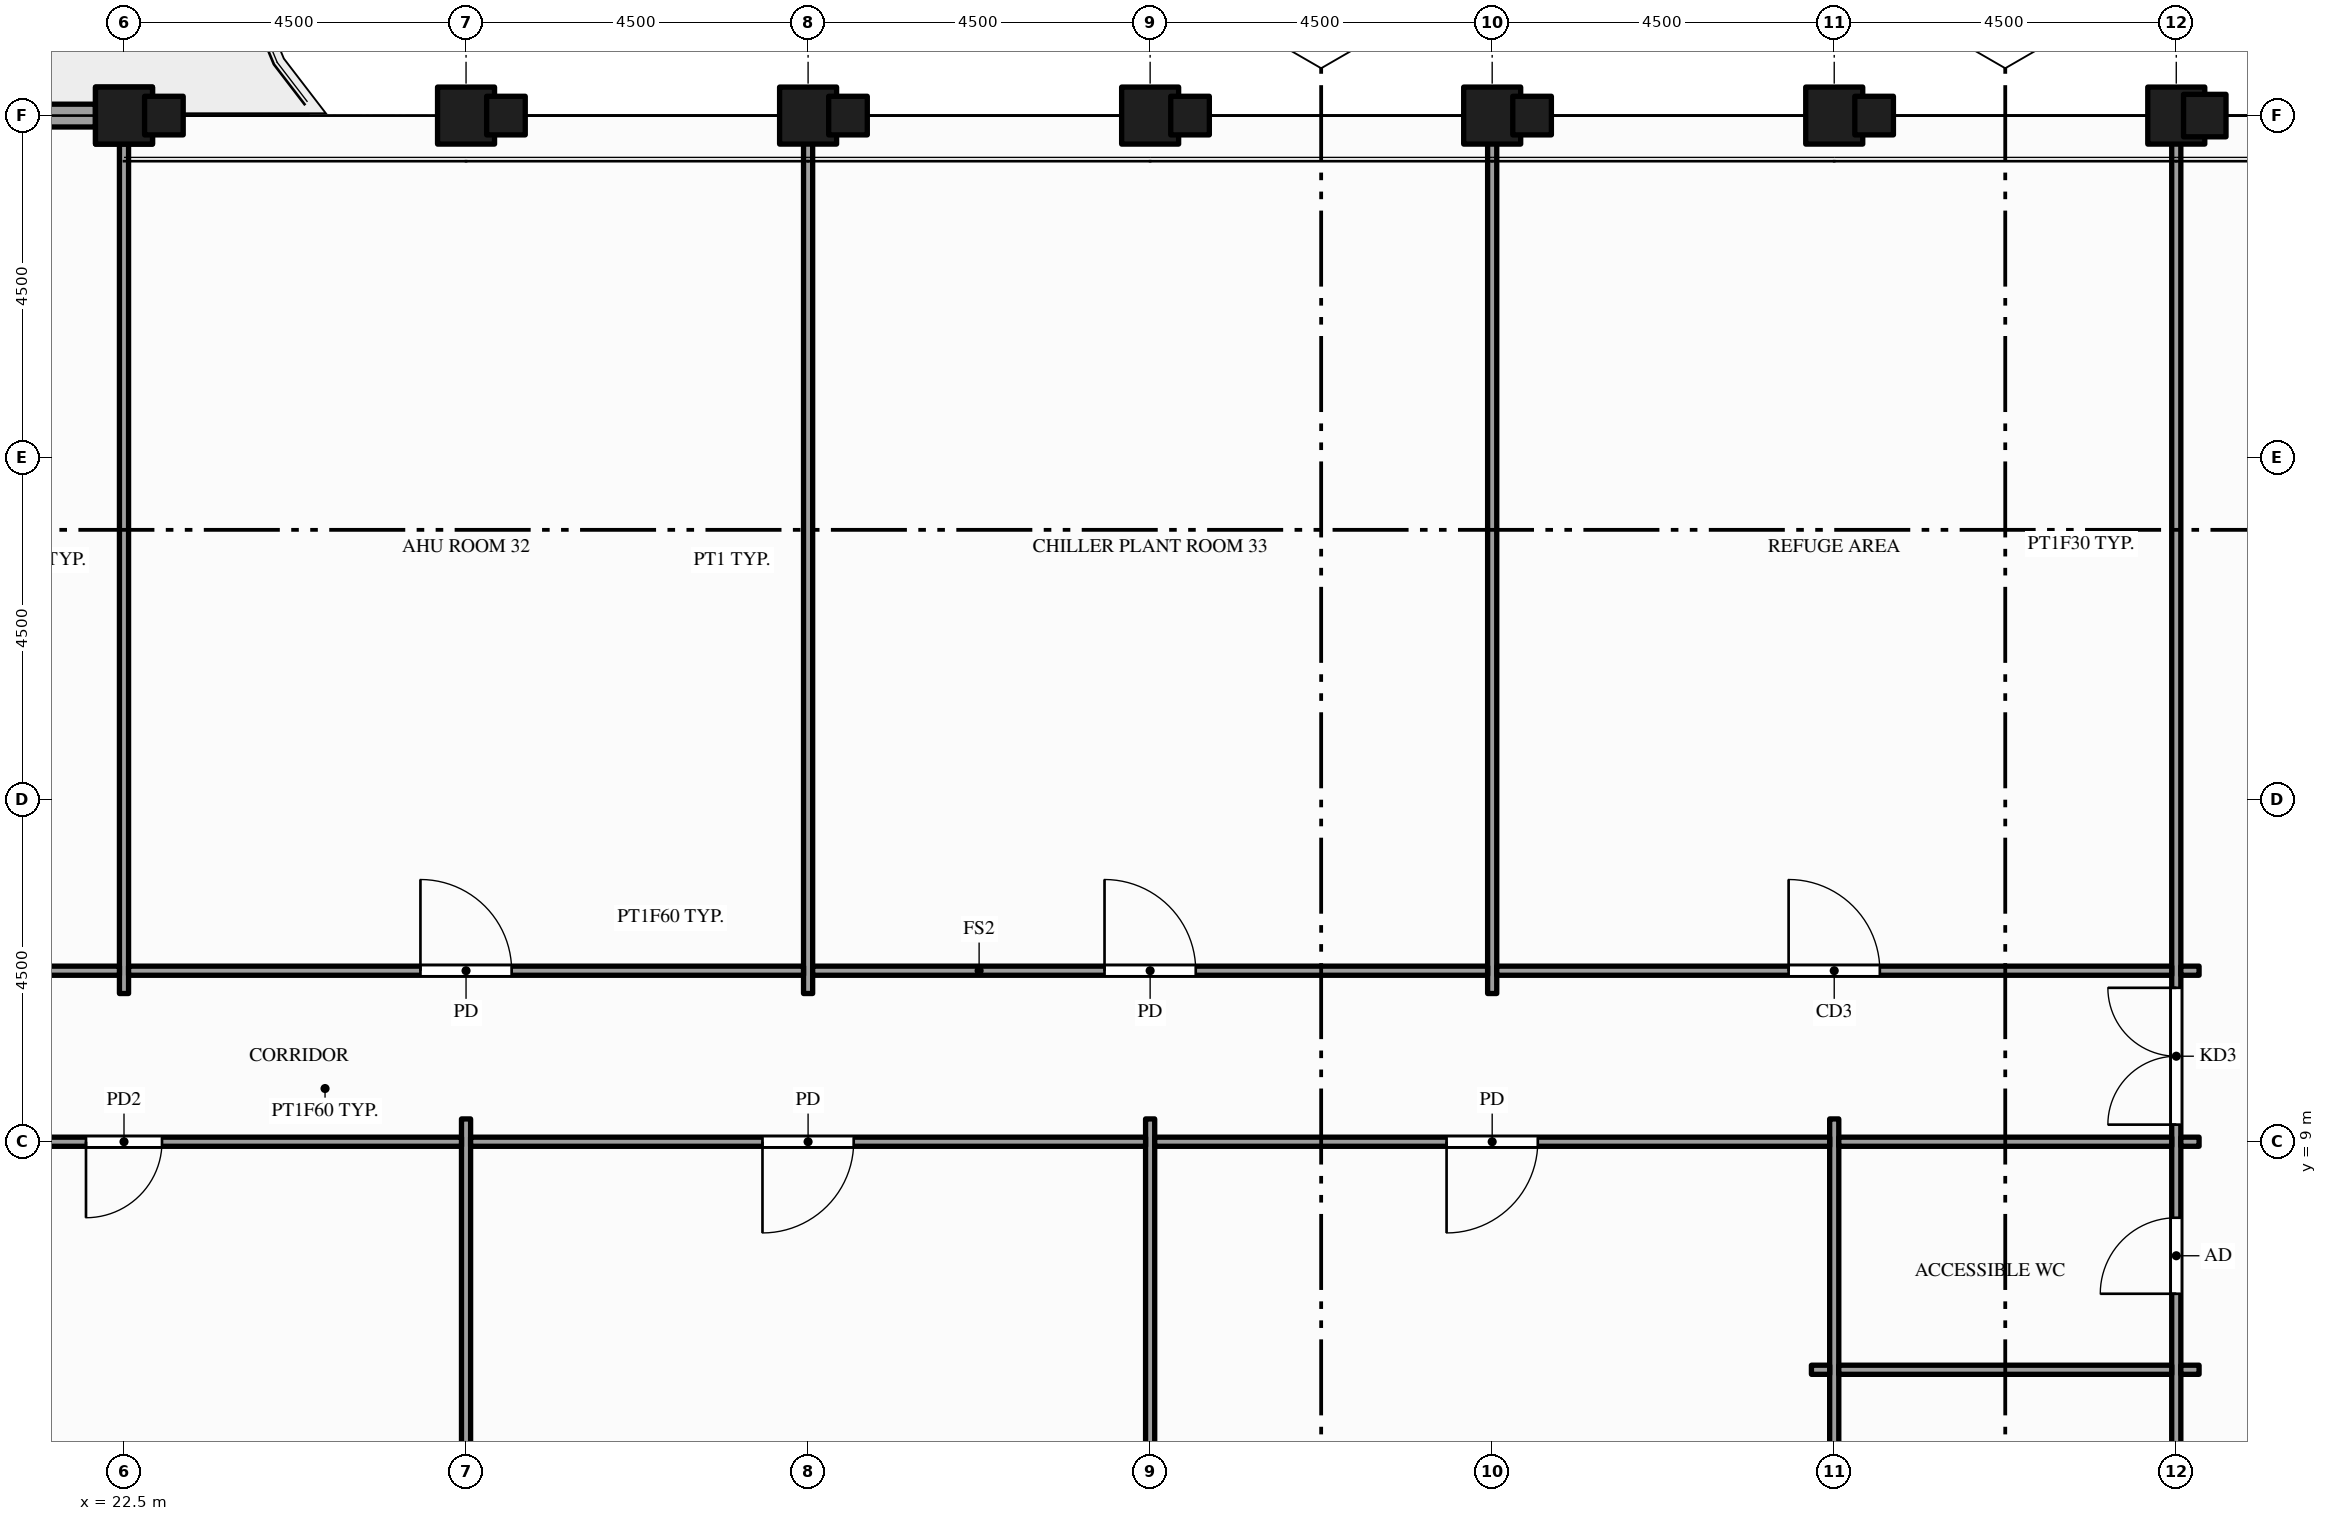
"""IFC4 building model, lengths in metres.
Left out: names, types, materials, properties, quantities, classifications, styles, units other than length and angle.
Written with IfcOpenShell. Run it as: python <this file> out.ifc"""

import sys

from ifc_helpers import new_model, si_unit, direction, frame, frame_2d, origin, origin_2d, place, context, subcontext, project, spatial, rectangle, hollow_rectangle, extrude, element, fill, save


model = new_model("IFC4")
c1 = context("Model", 3, precision=1e-05, world=origin(), true_north=direction((0.0, 1.0)))
c2 = subcontext(c1, "Body", "Model", "MODEL_VIEW")
j1 = project(units=[si_unit("LENGTHUNIT", "METRE"), si_unit("PLANEANGLEUNIT", "RADIAN")], contexts=[c1])
p1 = place(None, origin())
s1 = spatial("IfcSite", under=j1, at=p1, CompositionType="ELEMENT")
p2 = place(p1, origin())
s2 = spatial("IfcBuilding", under=s1, at=p2, CompositionType="ELEMENT")
p3 = place(p2, frame((0.0, 0.0, 243.0)))
s3 = spatial("IfcBuildingStorey", under=s2, at=p3, CompositionType="ELEMENT", Elevation=243.0)
p4 = place(p3, frame((22.5, 22.5, -0.3), z_axis=(0.0, 0.0, 1.0), x_axis=(1.0, 0.0, 0.0)))
e1 = element("IfcColumn", 1, at=p4, inside=s3, PredefinedType="COLUMN", context=c2, shape_type="SweptSolid", body=[
    extrude(hollow_rectangle(XDim=0.75, YDim=0.75, WallThickness=0.036, at=origin_2d()), origin(), (0.0, 0.0, 1.0), 4.65),
])
p5 = place(p3, frame((22.5, 22.5, 4.35), z_axis=(0.0, 0.0, 1.0), x_axis=(1.0, 0.0, 0.0)))
e2 = element("IfcColumn", 2, at=p5, inside=s3, PredefinedType="COLUMN", context=c2, shape_type="SweptSolid", body=[
    extrude(rectangle(XDim=0.75, YDim=0.75, at=origin_2d()), origin(), (0.0, 0.0, 1.0), 1.5),
])
for number, where, z_axis, x_axis in (
    (3, (27.0, 22.5, -0.25), (0.0, 0.0, 1.0), (1.0, 0.0, 0.0)),
    (4, (31.5, 22.5, -0.25), (0.0, 0.0, 1.0), (1.0, 0.0, 0.0)),
    (5, (36.0, 22.5, -0.25), (0.0, 0.0, 1.0), (1.0, 0.0, 0.0)),
    (6, (40.5, 22.5, -0.25), (0.0, 0.0, 1.0), (1.0, 0.0, 0.0)),
    (7, (45.0, 22.5, -0.25), (0.0, 0.0, 1.0), (1.0, 0.0, 0.0)),
    (8, (49.5, 22.5, -0.25), (0.0, 0.0, 1.0), (1.0, 0.0, 0.0)),
):
    element("IfcColumn", number, at=place(p3, frame(where, z_axis=z_axis, x_axis=x_axis)), inside=s3, PredefinedType="COLUMN", context=c2, shape_type="SweptSolid", body=[
        extrude(hollow_rectangle(XDim=0.75, YDim=0.75, WallThickness=0.036, at=origin_2d()), origin(), (0.0, 0.0, 1.0), 6.1),
    ])
p6 = place(p3, frame((22.125, 22.5, 0.0), z_axis=(0.0, 0.0, 1.0), x_axis=(-1.0, 0.0, 0.0)))
e9 = element("IfcWall", 9, at=p6, inside=s3, PredefinedType="STANDARD", context=c2, shape_type="SweptSolid", body=[
    extrude(rectangle(XDim=3.75, YDim=0.3, at=frame_2d((1.875, 0.0))), origin(), (0.0, 0.0, 1.0), 5.157),
])
p7 = place(p3, frame((22.5, 10.95, 0.0), z_axis=(0.0, 0.0, 1.0), x_axis=(0.0, 1.0, 0.0)))
e10 = element("IfcWall", 10, at=p7, inside=s3, PredefinedType="PARTITIONING", context=c2, shape_type="SweptSolid", body=[
    extrude(rectangle(XDim=11.4, YDim=0.12, at=frame_2d((5.7, 0.0))), origin(), (0.0, 0.0, 1.0), 4.87),
])
p8 = place(p3, frame((27.0, 0.15, 0.0), z_axis=(0.0, 0.0, 1.0), x_axis=(0.0, 1.0, 0.0)))
e11 = element("IfcWall", 11, at=p8, inside=s3, PredefinedType="PARTITIONING", context=c2, shape_type="SweptSolid", body=[
    extrude(rectangle(XDim=9.15, YDim=0.12, at=frame_2d((4.575, 0.0))), origin(), (0.0, 0.0, 1.0), 4.45),
])
p9 = place(p3, frame((31.5, 10.95, 0.0), z_axis=(0.0, 0.0, 1.0), x_axis=(0.0, 1.0, 0.0)))
e12 = element("IfcWall", 12, at=p9, inside=s3, PredefinedType="PARTITIONING", context=c2, shape_type="SweptSolid", body=[
    extrude(rectangle(XDim=11.4, YDim=0.12, at=frame_2d((5.7, 0.0))), origin(), (0.0, 0.0, 1.0), 4.87),
])
p10 = place(p3, frame((36.0, 0.15, 0.0), z_axis=(0.0, 0.0, 1.0), x_axis=(0.0, 1.0, 0.0)))
e13 = element("IfcWall", 13, at=p10, inside=s3, PredefinedType="PARTITIONING", context=c2, shape_type="SweptSolid", body=[
    extrude(rectangle(XDim=9.15, YDim=0.12, at=frame_2d((4.575, 0.0))), origin(), (0.0, 0.0, 1.0), 4.45),
])
p11 = place(p3, frame((40.5, 10.95, 0.0), z_axis=(0.0, 0.0, 1.0), x_axis=(0.0, 1.0, 0.0)))
e14 = element("IfcWall", 14, at=p11, inside=s3, PredefinedType="PARTITIONING", context=c2, shape_type="SweptSolid", body=[
    extrude(rectangle(XDim=11.4, YDim=0.12, at=frame_2d((5.7, 0.0))), origin(), (0.0, 0.0, 1.0), 4.87),
])
p12 = place(p3, frame((45.0, 0.15, 0.0), z_axis=(0.0, 0.0, 1.0), x_axis=(0.0, 1.0, 0.0)))
e15 = element("IfcWall", 15, at=p12, inside=s3, PredefinedType="PARTITIONING", context=c2, shape_type="SweptSolid", body=[
    extrude(rectangle(XDim=9.15, YDim=0.12, at=frame_2d((4.575, 0.0))), origin(), (0.0, 0.0, 1.0), 4.45),
])
p13 = place(p3, frame((49.5, 0.15, 0.0), z_axis=(0.0, 0.0, 1.0), x_axis=(0.0, 1.0, 0.0)))
e16 = element("IfcWall", 16, at=p13, inside=s3, PredefinedType="PARTITIONING", context=c2, shape_type="SweptSolid", body=[
    extrude(rectangle(XDim=22.2, YDim=0.12, at=frame_2d((11.1, 0.0))), origin(), (0.0, 0.0, 1.0), 4.45),
])
p14 = place(p13, frame((9.075, 0.0, 0.0)))
e17 = element("IfcOpeningElement", 17, at=p14, cuts=e16, PredefinedType="OPENING", context=c2, shape_type="SweptSolid", body=[
    extrude(rectangle(XDim=1.8, YDim=2.1, at=frame_2d((0.9, 1.05))), frame((0.0, 0.07, 0.0), z_axis=(0.0, -1.0, 0.0), x_axis=(1.0, 0.0, 0.0)), (0.0, 0.0, 1.0), 0.14),
])
p15 = place(p13, frame((0.85, 0.0, 0.0)))
e18 = element("IfcOpeningElement", 18, at=p15, cuts=e16, PredefinedType="OPENING", context=c2, shape_type="SweptSolid", body=[
    extrude(rectangle(XDim=0.9, YDim=2.1, at=frame_2d((0.45, 1.05))), frame((0.0, 0.07, 0.0), z_axis=(0.0, -1.0, 0.0), x_axis=(1.0, 0.0, 0.0)), (0.0, 0.0, 1.0), 0.14),
])
p16 = place(p13, frame((3.9, 0.0, 0.0)))
e19 = element("IfcOpeningElement", 19, at=p16, cuts=e16, PredefinedType="OPENING", context=c2, shape_type="SweptSolid", body=[
    extrude(rectangle(XDim=0.9, YDim=2.1, at=frame_2d((0.45, 1.05))), frame((0.0, 0.07, 0.0), z_axis=(0.0, -1.0, 0.0), x_axis=(1.0, 0.0, 0.0)), (0.0, 0.0, 1.0), 0.14),
])
p17 = place(p13, frame((6.85, 0.0, 0.0)))
e20 = element("IfcOpeningElement", 20, at=p17, cuts=e16, PredefinedType="OPENING", context=c2, shape_type="SweptSolid", body=[
    extrude(rectangle(XDim=1.0, YDim=2.1, at=frame_2d((0.5, 1.05))), frame((0.0, 0.07, 0.0), z_axis=(0.0, -1.0, 0.0), x_axis=(1.0, 0.0, 0.0)), (0.0, 0.0, 1.0), 0.14),
])
p18 = place(p3, frame((44.7, 6.0, 0.0), z_axis=(0.0, 0.0, 1.0), x_axis=(1.0, 0.0, 0.0)))
e21 = element("IfcWall", 21, at=p18, inside=s3, PredefinedType="PARTITIONING", context=c2, shape_type="SweptSolid", body=[
    extrude(rectangle(XDim=0.24, YDim=0.12, at=frame_2d((0.12, 0.0))), origin(), (0.0, 0.0, 1.0), 4.87),
])
p19 = place(p3, frame((45.06, 6.0, 0.0), z_axis=(0.0, 0.0, 1.0), x_axis=(1.0, 0.0, 0.0)))
e22 = element("IfcWall", 22, at=p19, inside=s3, PredefinedType="PARTITIONING", context=c2, shape_type="SweptSolid", body=[
    extrude(rectangle(XDim=4.38, YDim=0.12, at=frame_2d((2.19, 0.0))), origin(), (0.0, 0.0, 1.0), 4.87),
])
p20 = place(p3, frame((49.56, 6.0, 0.0), z_axis=(0.0, 0.0, 1.0), x_axis=(1.0, 0.0, 0.0)))
e23 = element("IfcWall", 23, at=p20, inside=s3, PredefinedType="PARTITIONING", context=c2, shape_type="SweptSolid", body=[
    extrude(rectangle(XDim=0.24, YDim=0.12, at=frame_2d((0.12, 0.0))), origin(), (0.0, 0.0, 1.0), 4.87),
])
p21 = place(p3, frame((18.06, 9.0, 0.0), z_axis=(0.0, 0.0, 1.0), x_axis=(1.0, 0.0, 0.0)))
e24 = element("IfcWall", 24, at=p21, inside=s3, PredefinedType="PARTITIONING", context=c2, shape_type="SweptSolid", body=[
    extrude(rectangle(XDim=8.88, YDim=0.12, at=frame_2d((4.44, 0.0))), origin(), (0.0, 0.0, 1.0), 4.87),
])
p22 = place(p21, frame((3.94, 0.0, 0.0)))
e25 = element("IfcOpeningElement", 25, at=p22, cuts=e24, PredefinedType="OPENING", context=c2, shape_type="SweptSolid", body=[
    extrude(rectangle(XDim=1.0, YDim=2.1, at=frame_2d((0.5, 1.05))), frame((0.0, 0.07, 0.0), z_axis=(0.0, -1.0, 0.0), x_axis=(1.0, 0.0, 0.0)), (0.0, 0.0, 1.0), 0.14),
])
p23 = place(p3, frame((27.06, 9.0, 0.0), z_axis=(0.0, 0.0, 1.0), x_axis=(1.0, 0.0, 0.0)))
e26 = element("IfcWall", 26, at=p23, inside=s3, PredefinedType="PARTITIONING", context=c2, shape_type="SweptSolid", body=[
    extrude(rectangle(XDim=8.88, YDim=0.12, at=frame_2d((4.44, 0.0))), origin(), (0.0, 0.0, 1.0), 4.87),
])
p24 = place(p23, frame((3.84, 0.0, 0.0)))
e27 = element("IfcOpeningElement", 27, at=p24, cuts=e26, PredefinedType="OPENING", context=c2, shape_type="SweptSolid", body=[
    extrude(rectangle(XDim=1.2, YDim=2.1, at=frame_2d((0.6, 1.05))), frame((0.0, 0.07, 0.0), z_axis=(0.0, -1.0, 0.0), x_axis=(1.0, 0.0, 0.0)), (0.0, 0.0, 1.0), 0.14),
])
p25 = place(p3, frame((36.06, 9.0, 0.0), z_axis=(0.0, 0.0, 1.0), x_axis=(1.0, 0.0, 0.0)))
e28 = element("IfcWall", 28, at=p25, inside=s3, PredefinedType="PARTITIONING", context=c2, shape_type="SweptSolid", body=[
    extrude(rectangle(XDim=8.88, YDim=0.12, at=frame_2d((4.44, 0.0))), origin(), (0.0, 0.0, 1.0), 4.87),
])
p26 = place(p25, frame((3.84, 0.0, 0.0)))
e29 = element("IfcOpeningElement", 29, at=p26, cuts=e28, PredefinedType="OPENING", context=c2, shape_type="SweptSolid", body=[
    extrude(rectangle(XDim=1.2, YDim=2.1, at=frame_2d((0.6, 1.05))), frame((0.0, 0.07, 0.0), z_axis=(0.0, -1.0, 0.0), x_axis=(1.0, 0.0, 0.0)), (0.0, 0.0, 1.0), 0.14),
])
p27 = place(p3, frame((45.06, 9.0, 0.0), z_axis=(0.0, 0.0, 1.0), x_axis=(1.0, 0.0, 0.0)))
e30 = element("IfcWall", 30, at=p27, inside=s3, PredefinedType="PARTITIONING", context=c2, shape_type="SweptSolid", body=[
    extrude(rectangle(XDim=4.38, YDim=0.12, at=frame_2d((2.19, 0.0))), origin(), (0.0, 0.0, 1.0), 4.87),
])
p28 = place(p3, frame((49.56, 9.0, 0.0), z_axis=(0.0, 0.0, 1.0), x_axis=(1.0, 0.0, 0.0)))
e31 = element("IfcWall", 31, at=p28, inside=s3, PredefinedType="PARTITIONING", context=c2, shape_type="SweptSolid", body=[
    extrude(rectangle(XDim=0.24, YDim=0.12, at=frame_2d((0.12, 0.0))), origin(), (0.0, 0.0, 1.0), 4.87),
])
p29 = place(p3, frame((0.15, 11.25, 0.0), z_axis=(0.0, 0.0, 1.0), x_axis=(1.0, 0.0, 0.0)))
e32 = element("IfcWall", 32, at=p29, inside=s3, PredefinedType="PARTITIONING", context=c2, shape_type="SweptSolid", body=[
    extrude(rectangle(XDim=22.29, YDim=0.12, at=frame_2d((11.145, 0.0))), origin(), (0.0, 0.0, 1.0), 4.87),
])
p30 = place(p29, frame((10.255, 0.0, 0.0)))
e33 = element("IfcOpeningElement", 33, at=p30, cuts=e32, PredefinedType="OPENING", context=c2, shape_type="SweptSolid", body=[
    extrude(rectangle(XDim=1.8, YDim=2.1, at=frame_2d((0.9, 1.05))), frame((0.0, 0.07, 0.0), z_axis=(0.0, -1.0, 0.0), x_axis=(1.0, 0.0, 0.0)), (0.0, 0.0, 1.0), 0.14),
])
p31 = place(p3, frame((22.56, 11.25, 0.0), z_axis=(0.0, 0.0, 1.0), x_axis=(1.0, 0.0, 0.0)))
e34 = element("IfcWall", 34, at=p31, inside=s3, PredefinedType="PARTITIONING", context=c2, shape_type="SweptSolid", body=[
    extrude(rectangle(XDim=8.88, YDim=0.12, at=frame_2d((4.44, 0.0))), origin(), (0.0, 0.0, 1.0), 4.87),
])
p32 = place(p31, frame((3.84, 0.0, 0.0)))
e35 = element("IfcOpeningElement", 35, at=p32, cuts=e34, PredefinedType="OPENING", context=c2, shape_type="SweptSolid", body=[
    extrude(rectangle(XDim=1.2, YDim=2.1, at=frame_2d((0.6, 1.05))), frame((0.0, 0.07, 0.0), z_axis=(0.0, -1.0, 0.0), x_axis=(1.0, 0.0, 0.0)), (0.0, 0.0, 1.0), 0.14),
])
p33 = place(p3, frame((31.56, 11.25, 0.0), z_axis=(0.0, 0.0, 1.0), x_axis=(1.0, 0.0, 0.0)))
e36 = element("IfcWall", 36, at=p33, inside=s3, PredefinedType="PARTITIONING", context=c2, shape_type="SweptSolid", body=[
    extrude(rectangle(XDim=8.88, YDim=0.12, at=frame_2d((4.44, 0.0))), origin(), (0.0, 0.0, 1.0), 4.87),
])
p34 = place(p33, frame((3.84, 0.0, 0.0)))
e37 = element("IfcOpeningElement", 37, at=p34, cuts=e36, PredefinedType="OPENING", context=c2, shape_type="SweptSolid", body=[
    extrude(rectangle(XDim=1.2, YDim=2.1, at=frame_2d((0.6, 1.05))), frame((0.0, 0.07, 0.0), z_axis=(0.0, -1.0, 0.0), x_axis=(1.0, 0.0, 0.0)), (0.0, 0.0, 1.0), 0.14),
])
p35 = place(p3, frame((40.56, 11.25, 0.0), z_axis=(0.0, 0.0, 1.0), x_axis=(1.0, 0.0, 0.0)))
e38 = element("IfcWall", 38, at=p35, inside=s3, PredefinedType="PARTITIONING", context=c2, shape_type="SweptSolid", body=[
    extrude(rectangle(XDim=8.88, YDim=0.12, at=frame_2d((4.44, 0.0))), origin(), (0.0, 0.0, 1.0), 4.87),
])
p36 = place(p35, frame((3.84, 0.0, 0.0)))
e39 = element("IfcOpeningElement", 39, at=p36, cuts=e38, PredefinedType="OPENING", context=c2, shape_type="SweptSolid", body=[
    extrude(rectangle(XDim=1.2, YDim=2.1, at=frame_2d((0.6, 1.05))), frame((0.0, 0.07, 0.0), z_axis=(0.0, -1.0, 0.0), x_axis=(1.0, 0.0, 0.0)), (0.0, 0.0, 1.0), 0.14),
])
p37 = place(p3, frame((49.56, 11.25, 0.0), z_axis=(0.0, 0.0, 1.0), x_axis=(1.0, 0.0, 0.0)))
e40 = element("IfcWall", 40, at=p37, inside=s3, PredefinedType="PARTITIONING", context=c2, shape_type="SweptSolid", body=[
    extrude(rectangle(XDim=0.24, YDim=0.12, at=frame_2d((0.12, 0.0))), origin(), (0.0, 0.0, 1.0), 4.87),
])
p38 = place(p14, origin())
e41 = element("IfcDoor", 41, at=p38, inside=s3, OperationType="DOUBLE_DOOR_SINGLE_SWING", PredefinedType="DOOR", context=c2, shape_type="SweptSolid", body=[
    extrude(rectangle(XDim=1.8, YDim=2.1, at=frame_2d((0.9, 1.05))), frame((0.0, 0.025, 0.0), z_axis=(0.0, -1.0, 0.0), x_axis=(1.0, 0.0, 0.0)), (0.0, 0.0, 1.0), 0.05),
])
fill(e17, e41)
p39 = place(p22, origin())
e42 = element("IfcDoor", 42, at=p39, inside=s3, OperationType="SINGLE_SWING_LEFT", PredefinedType="DOOR", context=c2, shape_type="SweptSolid", body=[
    extrude(rectangle(XDim=1.0, YDim=2.1, at=frame_2d((0.5, 1.05))), frame((0.0, 0.025, 0.0), z_axis=(0.0, -1.0, 0.0), x_axis=(1.0, 0.0, 0.0)), (0.0, 0.0, 1.0), 0.05),
])
fill(e25, e42)
p40 = place(p24, origin())
e43 = element("IfcDoor", 43, at=p40, inside=s3, OperationType="SINGLE_SWING_LEFT", PredefinedType="DOOR", context=c2, shape_type="SweptSolid", body=[
    extrude(rectangle(XDim=1.2, YDim=2.1, at=frame_2d((0.6, 1.05))), frame((0.0, 0.025, 0.0), z_axis=(0.0, -1.0, 0.0), x_axis=(1.0, 0.0, 0.0)), (0.0, 0.0, 1.0), 0.05),
])
fill(e27, e43)
p41 = place(p26, origin())
e44 = element("IfcDoor", 44, at=p41, inside=s3, OperationType="SINGLE_SWING_LEFT", PredefinedType="DOOR", context=c2, shape_type="SweptSolid", body=[
    extrude(rectangle(XDim=1.2, YDim=2.1, at=frame_2d((0.6, 1.05))), frame((0.0, 0.025, 0.0), z_axis=(0.0, -1.0, 0.0), x_axis=(1.0, 0.0, 0.0)), (0.0, 0.0, 1.0), 0.05),
])
fill(e29, e44)
p42 = place(p17, origin())
e45 = element("IfcDoor", 45, at=p42, inside=s3, OperationType="SINGLE_SWING_LEFT", PredefinedType="DOOR", context=c2, shape_type="SweptSolid", body=[
    extrude(rectangle(XDim=1.0, YDim=2.1, at=frame_2d((0.5, 1.05))), frame((0.0, 0.025, 0.0), z_axis=(0.0, -1.0, 0.0), x_axis=(1.0, 0.0, 0.0)), (0.0, 0.0, 1.0), 0.05),
])
fill(e20, e45)
p43 = place(p32, origin())
e46 = element("IfcDoor", 46, at=p43, inside=s3, OperationType="SINGLE_SWING_LEFT", PredefinedType="DOOR", context=c2, shape_type="SweptSolid", body=[
    extrude(rectangle(XDim=1.2, YDim=2.1, at=frame_2d((0.6, 1.05))), frame((0.0, 0.025, 0.0), z_axis=(0.0, -1.0, 0.0), x_axis=(1.0, 0.0, 0.0)), (0.0, 0.0, 1.0), 0.05),
])
fill(e35, e46)
p44 = place(p34, origin())
e47 = element("IfcDoor", 47, at=p44, inside=s3, OperationType="SINGLE_SWING_LEFT", PredefinedType="DOOR", context=c2, shape_type="SweptSolid", body=[
    extrude(rectangle(XDim=1.2, YDim=2.1, at=frame_2d((0.6, 1.05))), frame((0.0, 0.025, 0.0), z_axis=(0.0, -1.0, 0.0), x_axis=(1.0, 0.0, 0.0)), (0.0, 0.0, 1.0), 0.05),
])
fill(e37, e47)
p45 = place(p36, origin())
e48 = element("IfcDoor", 48, at=p45, inside=s3, OperationType="SINGLE_SWING_LEFT", PredefinedType="DOOR", context=c2, shape_type="SweptSolid", body=[
    extrude(rectangle(XDim=1.2, YDim=2.1, at=frame_2d((0.6, 1.05))), frame((0.0, 0.025, 0.0), z_axis=(0.0, -1.0, 0.0), x_axis=(1.0, 0.0, 0.0)), (0.0, 0.0, 1.0), 0.05),
])
fill(e39, e48)
save(model, sys.argv[1])
